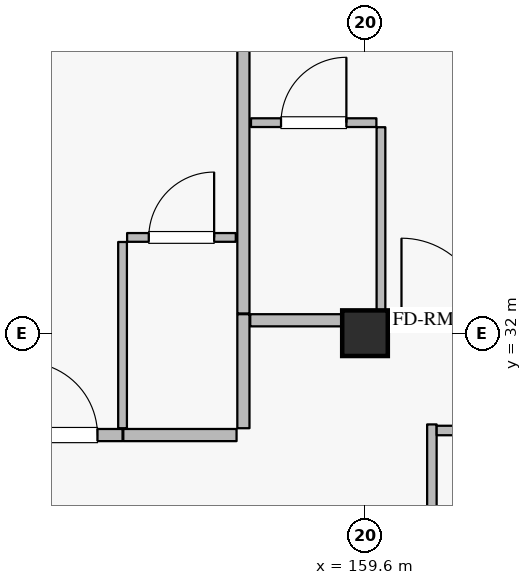
"""IFC4 building model, lengths in metres.
Left out: names, types, materials, properties, quantities, classifications, styles, units other than length and angle.
Written with IfcOpenShell. Run it as: python <this file> out.ifc"""

import sys

from ifc_helpers import new_model, si_unit, direction, frame, frame_2d, origin, origin_2d, place, context, subcontext, project, spatial, rectangle, extrude, element, fill, save


model = new_model("IFC4")
c1 = context("Model", 3, precision=1e-05, world=origin(), true_north=direction((0.0, 1.0)))
c2 = subcontext(c1, "Body", "Model", "MODEL_VIEW")
j1 = project(units=[si_unit("LENGTHUNIT", "METRE"), si_unit("PLANEANGLEUNIT", "RADIAN")], contexts=[c1])
p1 = place(None, origin())
s1 = spatial("IfcSite", under=j1, at=p1, CompositionType="ELEMENT")
p2 = place(p1, origin())
s2 = spatial("IfcBuilding", under=s1, at=p2, CompositionType="ELEMENT")
p3 = place(p2, frame((0.0, 0.0, 32.4)))
s3 = spatial("IfcBuildingStorey", under=s2, at=p3, CompositionType="ELEMENT", Elevation=32.4)
p4 = place(p3, frame((159.6, 32.0, 0.0), z_axis=(0.0, 0.0, 1.0), x_axis=(1.0, 0.0, 0.0)))
e1 = element("IfcColumn", 1, at=p4, inside=s3, PredefinedType="COLUMN", context=c2, shape_type="SweptSolid", body=[
    extrude(rectangle(XDim=0.6, YDim=0.6, at=origin_2d()), origin(), (0.0, 0.0, 1.0), 3.6),
])
p5 = place(p3, frame((154.79, 30.66, 0.0), z_axis=(0.0, 0.0, 1.0), x_axis=(1.0, 0.0, 0.0)))
e2 = element("IfcWall", 2, at=p5, inside=s3, PredefinedType="PARTITIONING", context=c2, shape_type="SweptSolid", body=[
    extrude(rectangle(XDim=1.62, YDim=0.16, at=frame_2d((0.81, 0.0))), origin(), (0.0, 0.0, 1.0), 3.335),
])
p6 = place(p5, frame((0.33, 0.0, 0.0)))
e3 = element("IfcOpeningElement", 3, at=p6, cuts=e2, PredefinedType="OPENING", context=c2, shape_type="SweptSolid", body=[
    extrude(rectangle(XDim=0.96, YDim=2.2, at=frame_2d((0.48, 1.1))), frame((0.0, 0.09, 0.0), z_axis=(0.0, -1.0, 0.0), x_axis=(1.0, 0.0, 0.0)), (0.0, 0.0, 1.0), 0.18),
])
p7 = place(p3, frame((156.42, 30.66, 0.0), z_axis=(0.0, 0.0, 1.0), x_axis=(1.0, 0.0, 0.0)))
e4 = element("IfcWall", 4, at=p7, inside=s3, PredefinedType="PARTITIONING", context=c2, shape_type="SweptSolid", body=[
    extrude(rectangle(XDim=1.49, YDim=0.16, at=frame_2d((0.745, 0.0))), origin(), (0.0, 0.0, 1.0), 3.335),
])
p8 = place(p3, frame((156.41, 30.75, 0.0), z_axis=(0.0, 0.0, 1.0), x_axis=(0.0, 1.0, 0.0)))
e5 = element("IfcWall", 5, at=p8, inside=s3, PredefinedType="PARTITIONING", context=c2, shape_type="SweptSolid", body=[
    extrude(rectangle(XDim=2.45, YDim=0.115, at=frame_2d((1.225, 0.0))), origin(), (0.0, 0.0, 1.0), 3.335),
])
p9 = place(p3, frame((156.47, 33.26, 0.0), z_axis=(0.0, 0.0, 1.0), x_axis=(1.0, 0.0, 0.0)))
e6 = element("IfcWall", 6, at=p9, inside=s3, PredefinedType="PARTITIONING", context=c2, shape_type="SweptSolid", body=[
    extrude(rectangle(XDim=1.43, YDim=0.115, at=frame_2d((0.715, 0.0))), origin(), (0.0, 0.0, 1.0), 3.335),
])
p10 = place(p9, frame((0.285, 0.0, 0.0)))
e7 = element("IfcOpeningElement", 7, at=p10, cuts=e6, PredefinedType="OPENING", context=c2, shape_type="SweptSolid", body=[
    extrude(rectangle(XDim=0.86, YDim=2.12, at=frame_2d((0.43, 1.06))), frame((0.0, 0.067, 0.0), z_axis=(0.0, -1.0, 0.0), x_axis=(1.0, 0.0, 0.0)), (0.0, 0.0, 1.0), 0.135),
])
p11 = place(p3, frame((158.0, 30.75, 0.0), z_axis=(0.0, 0.0, 1.0), x_axis=(0.0, 1.0, 0.0)))
e8 = element("IfcWall", 8, at=p11, inside=s3, PredefinedType="PARTITIONING", context=c2, shape_type="SweptSolid", body=[
    extrude(rectangle(XDim=1.5, YDim=0.16, at=frame_2d((0.75, 0.0))), origin(), (0.0, 0.0, 1.0), 3.335),
])
p12 = place(p3, frame((158.09, 32.17, 0.0), z_axis=(0.0, 0.0, 1.0), x_axis=(1.0, 0.0, 0.0)))
e9 = element("IfcWall", 9, at=p12, inside=s3, PredefinedType="PARTITIONING", context=c2, shape_type="SweptSolid", body=[
    extrude(rectangle(XDim=1.71, YDim=0.16, at=frame_2d((0.855, 0.0))), origin(), (0.0, 0.0, 1.0), 2.84),
])
p13 = place(p3, frame((159.81, 32.17, 0.0), z_axis=(0.0, 0.0, 1.0), x_axis=(1.0, 0.0, 0.0)))
e10 = element("IfcWall", 10, at=p13, inside=s3, PredefinedType="PARTITIONING", context=c2, shape_type="SweptSolid", body=[
    extrude(rectangle(XDim=1.62, YDim=0.16, at=frame_2d((0.81, 0.0))), origin(), (0.0, 0.0, 1.0), 3.335),
])
p14 = place(p13, frame((0.27, 0.0, 0.0)))
e11 = element("IfcOpeningElement", 11, at=p14, cuts=e10, PredefinedType="OPENING", context=c2, shape_type="SweptSolid", body=[
    extrude(rectangle(XDim=1.08, YDim=2.3, at=frame_2d((0.54, 1.15))), frame((0.0, 0.09, 0.0), z_axis=(0.0, -1.0, 0.0), x_axis=(1.0, 0.0, 0.0)), (0.0, 0.0, 1.0), 0.18),
])
p15 = place(p3, frame((159.81, 32.26, 0.0), z_axis=(0.0, 0.0, 1.0), x_axis=(0.0, 1.0, 0.0)))
e12 = element("IfcWall", 12, at=p15, inside=s3, PredefinedType="PARTITIONING", context=c2, shape_type="SweptSolid", body=[
    extrude(rectangle(XDim=2.45, YDim=0.115, at=frame_2d((1.225, 0.0))), origin(), (0.0, 0.0, 1.0), 2.74),
])
p16 = place(p3, frame((158.1, 34.77, 0.0), z_axis=(0.0, 0.0, 1.0), x_axis=(1.0, 0.0, 0.0)))
e13 = element("IfcWall", 13, at=p16, inside=s3, PredefinedType="PARTITIONING", context=c2, shape_type="SweptSolid", body=[
    extrude(rectangle(XDim=1.65, YDim=0.115, at=frame_2d((0.825, 0.0))), origin(), (0.0, 0.0, 1.0), 3.335),
])
p17 = place(p16, frame((0.395, 0.0, 0.0)))
e14 = element("IfcOpeningElement", 14, at=p17, cuts=e13, PredefinedType="OPENING", context=c2, shape_type="SweptSolid", body=[
    extrude(rectangle(XDim=0.86, YDim=2.12, at=frame_2d((0.43, 1.06))), frame((0.0, 0.067, 0.0), z_axis=(0.0, -1.0, 0.0), x_axis=(1.0, 0.0, 0.0)), (0.0, 0.0, 1.0), 0.135),
])
p18 = place(p3, frame((158.0, 32.26, 0.0), z_axis=(0.0, 0.0, 1.0), x_axis=(0.0, 1.0, 0.0)))
e15 = element("IfcWall", 15, at=p18, inside=s3, PredefinedType="PARTITIONING", context=c2, shape_type="SweptSolid", body=[
    extrude(rectangle(XDim=7.4, YDim=0.16, at=frame_2d((3.7, 0.0))), origin(), (0.0, 0.0, 1.0), 3.335),
])
p19 = place(p3, frame((160.48, 28.004, 0.0), z_axis=(0.0, 0.0, 1.0), x_axis=(0.0, 1.0, 0.0)))
e16 = element("IfcWall", 16, at=p19, inside=s3, PredefinedType="PARTITIONING", context=c2, shape_type="SweptSolid", body=[
    extrude(rectangle(XDim=2.796, YDim=0.125, at=frame_2d((1.398, 0.0))), origin(), (0.0, 0.0, 1.0), 3.335),
])
p20 = place(p3, frame((160.543, 30.72, 0.0), z_axis=(0.0, 0.0, 1.0), x_axis=(1.0, 0.0, 0.0)))
e17 = element("IfcWall", 17, at=p20, inside=s3, PredefinedType="PARTITIONING", context=c2, shape_type="SweptSolid", body=[
    extrude(rectangle(XDim=6.514, YDim=0.125, at=frame_2d((3.257, 0.0))), origin(), (0.0, 0.0, 1.0), 3.335),
])
p21 = place(p6, origin())
e18 = element("IfcDoor", 18, at=p21, inside=s3, OperationType="SINGLE_SWING_LEFT", PredefinedType="DOOR", context=c2, shape_type="SweptSolid", body=[
    extrude(rectangle(XDim=0.96, YDim=2.2, at=frame_2d((0.48, 1.1))), frame((0.0, 0.025, 0.0), z_axis=(0.0, -1.0, 0.0), x_axis=(1.0, 0.0, 0.0)), (0.0, 0.0, 1.0), 0.05),
])
fill(e3, e18)
p22 = place(p10, origin())
e19 = element("IfcDoor", 19, at=p22, inside=s3, OperationType="SINGLE_SWING_RIGHT", PredefinedType="DOOR", context=c2, shape_type="SweptSolid", body=[
    extrude(rectangle(XDim=0.86, YDim=2.12, at=frame_2d((0.43, 1.06))), frame((0.0, 0.025, 0.0), z_axis=(0.0, -1.0, 0.0), x_axis=(1.0, 0.0, 0.0)), (0.0, 0.0, 1.0), 0.05),
])
fill(e7, e19)
p23 = place(p14, origin())
e20 = element("IfcDoor", 20, at=p23, inside=s3, OperationType="SINGLE_SWING_LEFT", PredefinedType="DOOR", context=c2, shape_type="SweptSolid", body=[
    extrude(rectangle(XDim=1.08, YDim=2.3, at=frame_2d((0.54, 1.15))), frame((0.0, 0.025, 0.0), z_axis=(0.0, -1.0, 0.0), x_axis=(1.0, 0.0, 0.0)), (0.0, 0.0, 1.0), 0.05),
])
fill(e11, e20)
p24 = place(p17, origin())
e21 = element("IfcDoor", 21, at=p24, inside=s3, OperationType="SINGLE_SWING_RIGHT", PredefinedType="DOOR", context=c2, shape_type="SweptSolid", body=[
    extrude(rectangle(XDim=0.86, YDim=2.12, at=frame_2d((0.43, 1.06))), frame((0.0, 0.025, 0.0), z_axis=(0.0, -1.0, 0.0), x_axis=(1.0, 0.0, 0.0)), (0.0, 0.0, 1.0), 0.05),
])
fill(e14, e21)
save(model, sys.argv[1])
